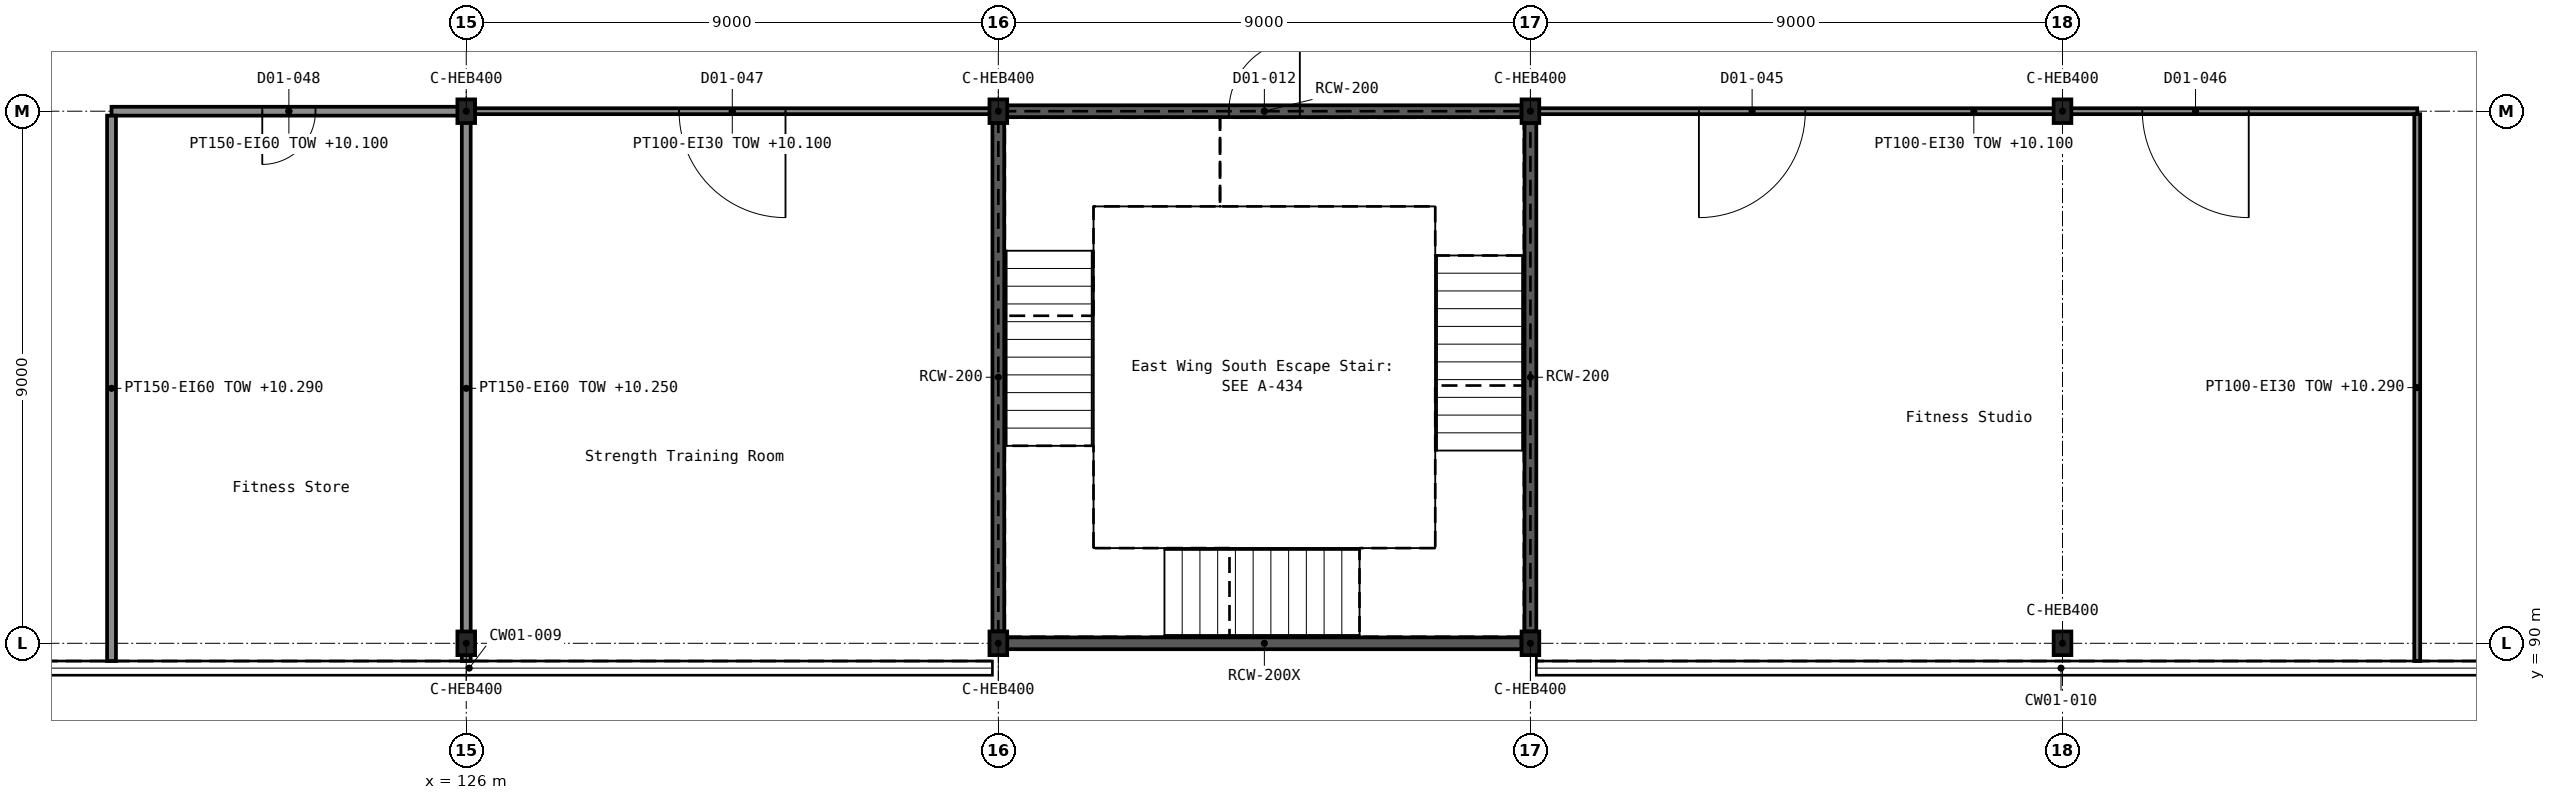
"""IFC4 building model, lengths in metres.
Left out: names, types, materials, properties, quantities, classifications, styles, units other than length and angle.
Written with IfcOpenShell. Run it as: python <this file> out.ifc"""

import sys

from ifc_helpers import new_model, si_unit, direction, frame, frame_2d, origin, origin_2d, place, context, subcontext, project, spatial, rectangle, i_section, extrude, element, fill, save


model = new_model("IFC4")
c1 = context("Model", 3, precision=1e-05, world=origin(), true_north=direction((0.0, 1.0)))
c2 = subcontext(c1, "Body", "Model", "MODEL_VIEW")
j1 = project(units=[si_unit("LENGTHUNIT", "METRE"), si_unit("PLANEANGLEUNIT", "RADIAN")], contexts=[c1])
p1 = place(None, origin())
s1 = spatial("IfcSite", under=j1, at=p1, CompositionType="ELEMENT")
p2 = place(p1, origin())
s2 = spatial("IfcBuilding", under=s1, at=p2, CompositionType="ELEMENT")
p3 = place(p2, frame((0.0, 0.0, 5.4)))
s3 = spatial("IfcBuildingStorey", under=s2, at=p3, CompositionType="ELEMENT", Elevation=5.4)
for number, where, z_axis, x_axis in (
    (1, (126.0, 90.0, 0.0), (0.0, 0.0, 1.0), (1.0, 0.0, 0.0)),
    (2, (135.0, 90.0, 0.0), (0.0, 0.0, 1.0), (1.0, 0.0, 0.0)),
    (3, (144.0, 90.0, 0.0), (0.0, 0.0, 1.0), (1.0, 0.0, 0.0)),
    (4, (153.0, 90.0, 0.0), (0.0, 0.0, 1.0), (1.0, 0.0, 0.0)),
    (5, (126.0, 99.0, 0.0), (0.0, 0.0, 1.0), (1.0, 0.0, 0.0)),
    (6, (135.0, 99.0, 0.0), (0.0, 0.0, 1.0), (1.0, 0.0, 0.0)),
    (7, (144.0, 99.0, 0.0), (0.0, 0.0, 1.0), (1.0, 0.0, 0.0)),
    (8, (153.0, 99.0, 0.0), (0.0, 0.0, 1.0), (1.0, 0.0, 0.0)),
):
    element("IfcColumn", number, at=place(p3, frame(where, z_axis=z_axis, x_axis=x_axis)), inside=s3, PredefinedType="COLUMN", context=c2, shape_type="SweptSolid", body=[
        extrude(i_section(OverallWidth=0.3, OverallDepth=0.4, WebThickness=0.013, FlangeThickness=0.024, FilletRadius=0.027, at=origin_2d()), origin(), (0.0, 0.0, 1.0), 5.4),
    ])
p4 = place(p3, frame((135.15, 90.0, 0.0), z_axis=(0.0, 0.0, 1.0), x_axis=(1.0, 0.0, 0.0)))
e9 = element("IfcWall", 9, at=p4, inside=s3, PredefinedType="SHEAR", context=c2, shape_type="SweptSolid", body=[
    extrude(rectangle(XDim=8.7, YDim=0.2, at=frame_2d((4.35, 0.0))), origin(), (0.0, 0.0, 1.0), 5.4),
])
p5 = place(p3, frame((135.15, 99.0, 0.0), z_axis=(0.0, 0.0, 1.0), x_axis=(1.0, 0.0, 0.0)))
e10 = element("IfcWall", 10, at=p5, inside=s3, PredefinedType="SHEAR", context=c2, shape_type="SweptSolid", body=[
    extrude(rectangle(XDim=8.7, YDim=0.2, at=frame_2d((4.35, 0.0))), origin(), (0.0, 0.0, 1.0), 5.4),
])
p6 = place(p5, frame((3.75, 0.0, 0.0)))
e11 = element("IfcOpeningElement", 11, at=p6, cuts=e10, PredefinedType="OPENING", context=c2, shape_type="SweptSolid", body=[
    extrude(rectangle(XDim=1.2, YDim=2.1, at=frame_2d((0.6, 1.05))), frame((0.0, 0.111, 0.0), z_axis=(0.0, -1.0, 0.0), x_axis=(1.0, 0.0, 0.0)), (0.0, 0.0, 1.0), 0.222),
])
for number, where, z_axis, x_axis in (
    (12, (135.0, 90.2, 0.0), (0.0, 0.0, 1.0), (0.0, 1.0, 0.0)),
    (13, (144.0, 90.2, 0.0), (0.0, 0.0, 1.0), (0.0, 1.0, 0.0)),
):
    element("IfcWall", number, at=place(p3, frame(where, z_axis=z_axis, x_axis=x_axis)), inside=s3, PredefinedType="SHEAR", context=c2, shape_type="SweptSolid", body=[
        extrude(rectangle(XDim=8.6, YDim=0.2, at=frame_2d((4.3, 0.0))), origin(), (0.0, 0.0, 1.0), 5.4),
    ])
p7 = place(p3, frame((120.0, 99.0, 0.0), z_axis=(0.0, 0.0, 1.0), x_axis=(1.0, 0.0, 0.0)))
e14 = element("IfcWall", 14, at=p7, inside=s3, PredefinedType="PARTITIONING", context=c2, shape_type="SweptSolid", body=[
    extrude(rectangle(XDim=6.0, YDim=0.15, at=frame_2d((3.0, 0.0))), origin(), (0.0, 0.0, 1.0), 4.7),
])
p8 = place(p7, frame((2.55, 0.0, 0.0)))
e15 = element("IfcOpeningElement", 15, at=p8, cuts=e14, PredefinedType="OPENING", context=c2, shape_type="SweptSolid", body=[
    extrude(rectangle(XDim=0.9, YDim=2.4, at=frame_2d((0.45, 1.2))), frame((0.0, 0.086, 0.0), z_axis=(0.0, -1.0, 0.0), x_axis=(1.0, 0.0, 0.0)), (0.0, 0.0, 1.0), 0.172),
])
p9 = place(p3, frame((120.0, 89.7, 0.0), z_axis=(0.0, 0.0, 1.0), x_axis=(0.0, 1.0, 0.0)))
e16 = element("IfcWall", 16, at=p9, inside=s3, PredefinedType="PARTITIONING", context=c2, shape_type="SweptSolid", body=[
    extrude(rectangle(XDim=9.225, YDim=0.15, at=frame_2d((4.613, 0.0))), origin(), (0.0, 0.0, 1.0), 4.89),
])
p10 = place(p3, frame((126.0, 89.7, 0.0), z_axis=(0.0, 0.0, 1.0), x_axis=(0.0, 1.0, 0.0)))
e17 = element("IfcWall", 17, at=p10, inside=s3, PredefinedType="PARTITIONING", context=c2, shape_type="SweptSolid", body=[
    extrude(rectangle(XDim=9.225, YDim=0.15, at=frame_2d((4.613, 0.0))), origin(), (0.0, 0.0, 1.0), 4.85),
])
p11 = place(p3, frame((126.0, 99.0, 0.0), z_axis=(0.0, 0.0, 1.0), x_axis=(1.0, 0.0, 0.0)))
e18 = element("IfcWall", 18, at=p11, inside=s3, PredefinedType="PARTITIONING", context=c2, shape_type="SweptSolid", body=[
    extrude(rectangle(XDim=9.0, YDim=0.1, at=frame_2d((4.5, 0.0))), origin(), (0.0, 0.0, 1.0), 4.7),
])
p12 = place(p11, frame((3.6, 0.0, 0.0)))
e19 = element("IfcOpeningElement", 19, at=p12, cuts=e18, PredefinedType="OPENING", context=c2, shape_type="SweptSolid", body=[
    extrude(rectangle(XDim=1.8, YDim=2.1, at=frame_2d((0.9, 1.05))), frame((0.0, 0.061, 0.0), z_axis=(0.0, -1.0, 0.0), x_axis=(1.0, 0.0, 0.0)), (0.0, 0.0, 1.0), 0.122),
])
p13 = place(p3, frame((144.0, 99.0, 0.0), z_axis=(0.0, 0.0, 1.0), x_axis=(1.0, 0.0, 0.0)))
e20 = element("IfcWall", 20, at=p13, inside=s3, PredefinedType="PARTITIONING", context=c2, shape_type="SweptSolid", body=[
    extrude(rectangle(XDim=15.0, YDim=0.1, at=frame_2d((7.5, 0.0))), origin(), (0.0, 0.0, 1.0), 4.7),
])
p14 = place(p13, frame((2.85, 0.0, 0.0)))
e21 = element("IfcOpeningElement", 21, at=p14, cuts=e20, PredefinedType="OPENING", context=c2, shape_type="SweptSolid", body=[
    extrude(rectangle(XDim=1.8, YDim=2.1, at=frame_2d((0.9, 1.05))), frame((0.0, 0.061, 0.0), z_axis=(0.0, -1.0, 0.0), x_axis=(1.0, 0.0, 0.0)), (0.0, 0.0, 1.0), 0.122),
])
p15 = place(p13, frame((10.35, 0.0, 0.0)))
e22 = element("IfcOpeningElement", 22, at=p15, cuts=e20, PredefinedType="OPENING", context=c2, shape_type="SweptSolid", body=[
    extrude(rectangle(XDim=1.8, YDim=2.1, at=frame_2d((0.9, 1.05))), frame((0.0, 0.061, 0.0), z_axis=(0.0, -1.0, 0.0), x_axis=(1.0, 0.0, 0.0)), (0.0, 0.0, 1.0), 0.122),
])
p16 = place(p3, frame((159.0, 89.7, 0.0), z_axis=(0.0, 0.0, 1.0), x_axis=(0.0, 1.0, 0.0)))
e23 = element("IfcWall", 23, at=p16, inside=s3, PredefinedType="PARTITIONING", context=c2, shape_type="SweptSolid", body=[
    extrude(rectangle(XDim=9.25, YDim=0.1, at=frame_2d((4.625, 0.0))), origin(), (0.0, 0.0, 1.0), 4.89),
])
p17 = place(p6, origin())
e24 = element("IfcDoor", 24, at=p17, inside=s3, OperationType="SINGLE_SWING_RIGHT", PredefinedType="DOOR", context=c2, shape_type="SweptSolid", body=[
    extrude(rectangle(XDim=1.2, YDim=2.1, at=frame_2d((0.6, 1.05))), frame((0.0, 0.025, 0.0), z_axis=(0.0, -1.0, 0.0), x_axis=(1.0, 0.0, 0.0)), (0.0, 0.0, 1.0), 0.05),
])
fill(e11, e24)
p18 = place(p14, frame((1.8, 0.0, 0.0), z_axis=(0.0, 0.0, 1.0), x_axis=(-1.0, 0.0, 0.0)))
e25 = element("IfcDoor", 25, at=p18, inside=s3, OperationType="DOUBLE_DOOR_SINGLE_SWING", PredefinedType="DOOR", context=c2, shape_type="SweptSolid", body=[
    extrude(rectangle(XDim=1.8, YDim=2.1, at=frame_2d((0.9, 1.05))), frame((0.0, 0.025, 0.0), z_axis=(0.0, -1.0, 0.0), x_axis=(1.0, 0.0, 0.0)), (0.0, 0.0, 1.0), 0.05),
])
fill(e21, e25)
p19 = place(p15, frame((1.8, 0.0, 0.0), z_axis=(0.0, 0.0, 1.0), x_axis=(-1.0, 0.0, 0.0)))
e26 = element("IfcDoor", 26, at=p19, inside=s3, OperationType="DOUBLE_DOOR_SINGLE_SWING", PredefinedType="DOOR", context=c2, shape_type="SweptSolid", body=[
    extrude(rectangle(XDim=1.8, YDim=2.1, at=frame_2d((0.9, 1.05))), frame((0.0, 0.025, 0.0), z_axis=(0.0, -1.0, 0.0), x_axis=(1.0, 0.0, 0.0)), (0.0, 0.0, 1.0), 0.05),
])
fill(e22, e26)
p20 = place(p12, frame((1.8, 0.0, 0.0), z_axis=(0.0, 0.0, 1.0), x_axis=(-1.0, 0.0, 0.0)))
e27 = element("IfcDoor", 27, at=p20, inside=s3, OperationType="DOUBLE_DOOR_SINGLE_SWING", PredefinedType="DOOR", context=c2, shape_type="SweptSolid", body=[
    extrude(rectangle(XDim=1.8, YDim=2.1, at=frame_2d((0.9, 1.05))), frame((0.0, 0.025, 0.0), z_axis=(0.0, -1.0, 0.0), x_axis=(1.0, 0.0, 0.0)), (0.0, 0.0, 1.0), 0.05),
])
fill(e19, e27)
p21 = place(p8, frame((0.9, 0.0, 0.0), z_axis=(0.0, 0.0, 1.0), x_axis=(-1.0, 0.0, 0.0)))
e28 = element("IfcDoor", 28, at=p21, inside=s3, OperationType="SINGLE_SWING_RIGHT", PredefinedType="DOOR", context=c2, shape_type="SweptSolid", body=[
    extrude(rectangle(XDim=0.9, YDim=2.4, at=frame_2d((0.45, 1.2))), frame((0.0, 0.025, 0.0), z_axis=(0.0, -1.0, 0.0), x_axis=(1.0, 0.0, 0.0)), (0.0, 0.0, 1.0), 0.05),
])
fill(e15, e28)
save(model, sys.argv[1])
